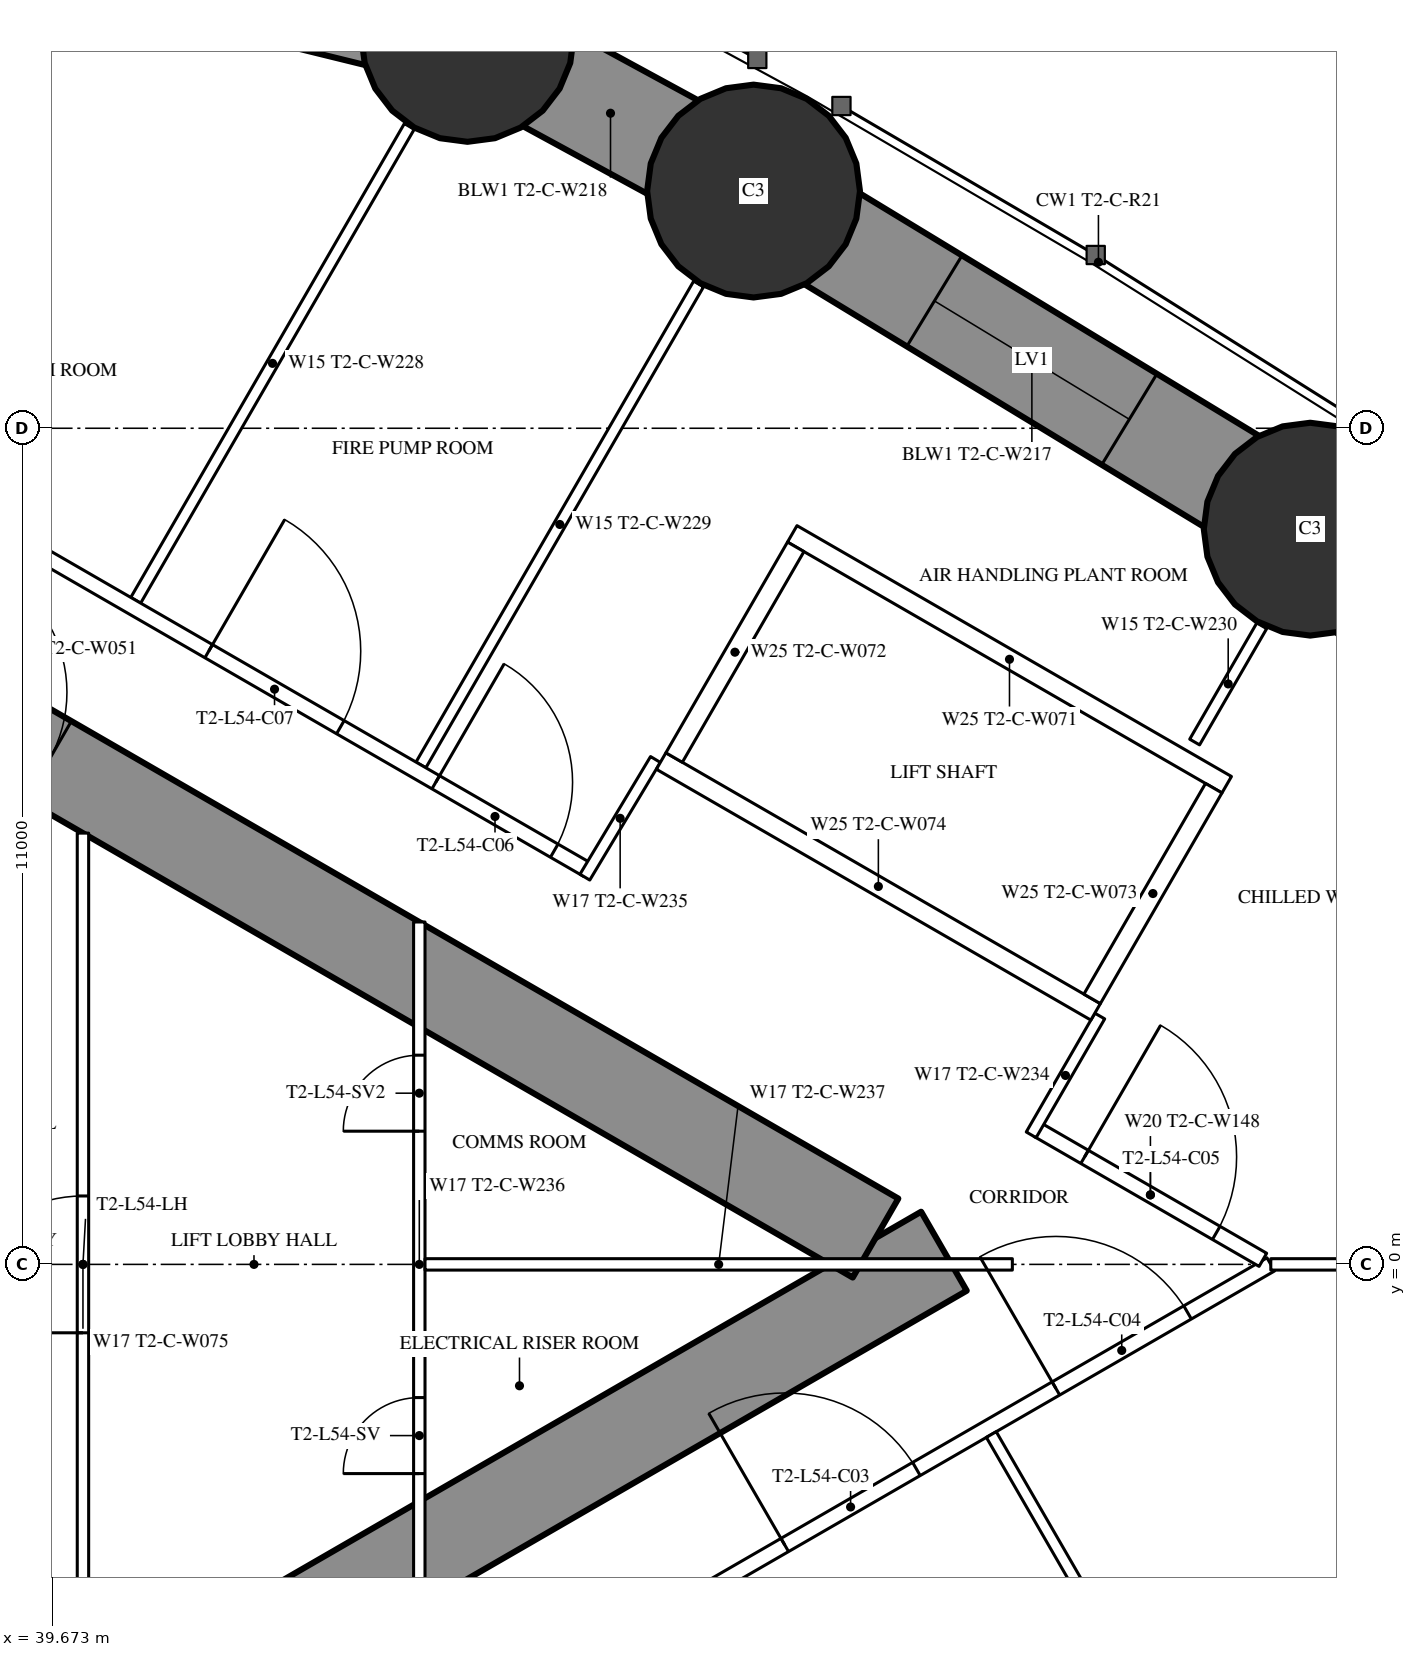
"""IFC4 building model, lengths in metres.
Left out: names, types, materials, properties, quantities, classifications, styles, units other than length and angle.
Written with IfcOpenShell. Run it as: python <this file> out.ifc"""

import sys

from ifc_helpers import new_model, si_unit, direction, frame, frame_2d, origin, origin_2d, place, context, subcontext, project, spatial, rectangle, circle, extrude, element, fill, save


model = new_model("IFC4")
c1 = context("Model", 3, precision=1e-05, world=origin(), true_north=direction((0.0, 1.0)))
c2 = subcontext(c1, "Body", "Model", "MODEL_VIEW")
j1 = project(units=[si_unit("LENGTHUNIT", "METRE"), si_unit("PLANEANGLEUNIT", "RADIAN")], contexts=[c1])
p1 = place(None, origin())
s1 = spatial("IfcSite", under=j1, at=p1, CompositionType="ELEMENT")
p2 = place(p1, origin())
s2 = spatial("IfcBuilding", under=s1, at=p2, CompositionType="ELEMENT")
p3 = place(p2, frame((0.0, 0.0, 201.8)))
s3 = spatial("IfcBuildingStorey", under=s2, at=p3, CompositionType="ELEMENT", Elevation=201.8)
for number, where, z_axis, x_axis in (
    (1, (56.221, 9.672, 0.0), (0.0, 0.0, 1.0), (1.0, 0.0, 0.0)),
    (2, (48.897, 14.121, 0.0), (0.0, 0.0, 1.0), (1.0, 0.0, 0.0)),
    (3, (45.134, 16.168, 0.0), (0.0, 0.0, 1.0), (1.0, 0.0, 0.0)),
):
    element("IfcColumn", number, at=place(p3, frame(where, z_axis=z_axis, x_axis=x_axis)), inside=s3, PredefinedType="COLUMN", context=c2, shape_type="SweptSolid", body=[
        extrude(circle(Radius=1.4, at=origin_2d()), origin(), (0.0, 0.0, 1.0), 3.5),
    ])
p4 = place(p3, frame((27.2, -13.8, 0.0), z_axis=(0.0, 0.0, 1.0), x_axis=(0.866027159892, 0.499996958321, 0.0)))
e4 = element("IfcWall", 4, at=p4, inside=s3, PredefinedType="SHEAR", context=c2, shape_type="SweptSolid", body=[
    extrude(rectangle(XDim=27.947, YDim=1.2, at=frame_2d((13.973, 0.0))), origin(), (0.0, 0.0, 1.0), 3.5),
])
p5 = place(p4, frame((6.5, 0.0, 0.0)))
e5 = element("IfcOpeningElement", 5, at=p5, cuts=e4, PredefinedType="OPENING", context=c2, shape_type="SweptSolid", body=[
    extrude(rectangle(XDim=1.0, YDim=2.2, at=frame_2d((0.5, 1.1))), frame((0.0, 0.61, 0.0), z_axis=(0.0, -1.0, 0.0), x_axis=(1.0, 0.0, 0.0)), (0.0, 0.0, 1.0), 1.22),
])
p6 = place(p4, frame((14.045, 0.0, 0.0)))
e6 = element("IfcOpeningElement", 6, at=p6, cuts=e4, PredefinedType="OPENING", context=c2, shape_type="SweptSolid", body=[
    extrude(rectangle(XDim=1.8, YDim=2.2, at=frame_2d((0.9, 1.1))), frame((0.0, 0.61, 0.0), z_axis=(0.0, -1.0, 0.0), x_axis=(1.0, 0.0, 0.0)), (0.0, 0.0, 1.0), 1.22),
])
p7 = place(p3, frame((27.2, 13.8, 0.0), z_axis=(0.0, 0.0, 1.0), x_axis=(0.866024515034, -0.500001539357, 0.0)))
e7 = element("IfcWall", 7, at=p7, inside=s3, PredefinedType="SHEAR", context=c2, shape_type="SweptSolid", body=[
    extrude(rectangle(XDim=26.907, YDim=1.2, at=frame_2d((13.454, 0.0))), origin(), (0.0, 0.0, 1.0), 3.5),
])
p8 = place(p7, frame((6.5, 0.0, 0.0)))
e8 = element("IfcOpeningElement", 8, at=p8, cuts=e7, PredefinedType="OPENING", context=c2, shape_type="SweptSolid", body=[
    extrude(rectangle(XDim=1.0, YDim=2.2, at=frame_2d((0.5, 1.1))), frame((0.0, 0.61, 0.0), z_axis=(0.0, -1.0, 0.0), x_axis=(1.0, 0.0, 0.0)), (0.0, 0.0, 1.0), 1.22),
])
p9 = place(p7, frame((12.545, 0.0, 0.0)))
e9 = element("IfcOpeningElement", 9, at=p9, cuts=e7, PredefinedType="OPENING", context=c2, shape_type="SweptSolid", body=[
    extrude(rectangle(XDim=1.8, YDim=2.2, at=frame_2d((0.9, 1.1))), frame((0.0, 0.61, 0.0), z_axis=(0.0, -1.0, 0.0), x_axis=(1.0, 0.0, 0.0)), (0.0, 0.0, 1.0), 1.22),
])
p10 = place(p3, frame((56.221, -9.672, 0.0), z_axis=(0.0, 0.0, 1.0), x_axis=(0.697649905443, 0.716438838587, 0.0)))
e10 = element("IfcWall", 10, at=p10, inside=s3, PredefinedType="SHEAR", context=c2, shape_type="SweptSolid", body=[
    extrude(rectangle(XDim=13.501, YDim=1.4, at=frame_2d((6.75, 0.0))), origin(), (0.0, 0.0, 1.0), 3.5),
])
p11 = place(p10, frame((5.25, 0.0, 0.6)))
e11 = element("IfcOpeningElement", 11, at=p11, cuts=e10, PredefinedType="OPENING", context=c2, shape_type="SweptSolid", body=[
    extrude(rectangle(XDim=3.0, YDim=1.2, at=frame_2d((1.5, 0.6))), frame((0.0, 0.71, 0.0), z_axis=(0.0, -1.0, 0.0), x_axis=(1.0, 0.0, 0.0)), (0.0, 0.0, 1.0), 1.42),
])
p12 = place(p3, frame((65.64, 0.0, 0.0), z_axis=(0.0, 0.0, 1.0), x_axis=(-0.697649905443, 0.716438838587, 0.0)))
e12 = element("IfcWall", 12, at=p12, inside=s3, PredefinedType="SHEAR", context=c2, shape_type="SweptSolid", body=[
    extrude(rectangle(XDim=13.501, YDim=1.4, at=frame_2d((6.75, 0.0))), origin(), (0.0, 0.0, 1.0), 3.5),
])
p13 = place(p12, frame((5.25, 0.0, 0.6)))
e13 = element("IfcOpeningElement", 13, at=p13, cuts=e12, PredefinedType="OPENING", context=c2, shape_type="SweptSolid", body=[
    extrude(rectangle(XDim=3.0, YDim=1.2, at=frame_2d((1.5, 0.6))), frame((0.0, 0.71, 0.0), z_axis=(0.0, -1.0, 0.0), x_axis=(1.0, 0.0, 0.0)), (0.0, 0.0, 1.0), 1.42),
])
p14 = place(p3, frame((56.221, 9.672, 0.0), z_axis=(0.0, 0.0, 1.0), x_axis=(-0.854692251129, 0.519135007353, 0.0)))
e14 = element("IfcWall", 14, at=p14, inside=s3, PredefinedType="SHEAR", context=c2, shape_type="SweptSolid", body=[
    extrude(rectangle(XDim=8.569, YDim=1.4, at=frame_2d((4.284, 0.0))), origin(), (0.0, 0.0, 1.0), 3.5),
])
p15 = place(p14, frame((2.784, 0.0, 0.6)))
e15 = element("IfcOpeningElement", 15, at=p15, cuts=e14, PredefinedType="OPENING", context=c2, shape_type="SweptSolid", body=[
    extrude(rectangle(XDim=3.0, YDim=1.2, at=frame_2d((1.5, 0.6))), frame((0.0, 0.71, 0.0), z_axis=(0.0, -1.0, 0.0), x_axis=(1.0, 0.0, 0.0)), (0.0, 0.0, 1.0), 1.42),
])
p16 = place(p3, frame((48.897, 14.121, 0.0), z_axis=(0.0, 0.0, 1.0), x_axis=(-0.878404597051, 0.477917737566, 0.0)))
e16 = element("IfcWall", 16, at=p16, inside=s3, PredefinedType="SHEAR", context=c2, shape_type="SweptSolid", body=[
    extrude(rectangle(XDim=4.285, YDim=1.4, at=frame_2d((2.143, 0.0))), origin(), (0.0, 0.0, 1.0), 3.5),
])
p17 = place(p3, frame((45.134, 16.168, 0.0), z_axis=(0.0, 0.0, 1.0), x_axis=(-0.971093253227, 0.238700426344, 0.0)))
e17 = element("IfcWall", 17, at=p17, inside=s3, PredefinedType="SHEAR", context=c2, shape_type="SweptSolid", body=[
    extrude(rectangle(XDim=13.772, YDim=1.4, at=frame_2d((6.886, 0.0))), origin(), (0.0, 0.0, 1.0), 3.5),
])
p18 = place(p17, frame((5.386, 0.0, 0.6)))
e18 = element("IfcOpeningElement", 18, at=p18, cuts=e17, PredefinedType="OPENING", context=c2, shape_type="SweptSolid", body=[
    extrude(rectangle(XDim=3.0, YDim=1.2, at=frame_2d((1.5, 0.6))), frame((0.0, 0.71, 0.0), z_axis=(0.0, -1.0, 0.0), x_axis=(1.0, 0.0, 0.0)), (0.0, 0.0, 1.0), 1.42),
])
p19 = place(p3, frame((27.903, -16.05, 0.0), z_axis=(0.0, 0.0, 1.0), x_axis=(0.866022581743, 0.500004887887, 0.0)))
e19 = element("IfcWall", 19, at=p19, inside=s3, PredefinedType="PARTITIONING", context=c2, shape_type="SweptSolid", body=[
    extrude(rectangle(XDim=32.1, YDim=0.2, at=frame_2d((16.05, 0.0))), origin(), (0.0, 0.0, 1.0), 3.25),
])
p20 = place(p19, frame((5.212, 0.0, 0.0)))
e20 = element("IfcOpeningElement", 20, at=p20, cuts=e19, PredefinedType="OPENING", context=c2, shape_type="SweptSolid", body=[
    extrude(rectangle(XDim=2.0, YDim=2.4, at=frame_2d((1.0, 1.2))), frame((0.0, 0.11, 0.0), z_axis=(0.0, -1.0, 0.0), x_axis=(1.0, 0.0, 0.0)), (0.0, 0.0, 1.0), 0.22),
])
p21 = place(p19, frame((18.133, 0.0, 0.0)))
e21 = element("IfcOpeningElement", 21, at=p21, cuts=e19, PredefinedType="OPENING", context=c2, shape_type="SweptSolid", body=[
    extrude(rectangle(XDim=2.0, YDim=2.4, at=frame_2d((1.0, 1.2))), frame((0.0, 0.11, 0.0), z_axis=(0.0, -1.0, 0.0), x_axis=(1.0, 0.0, 0.0)), (0.0, 0.0, 1.0), 0.22),
])
p22 = place(p19, frame((24.717, 0.0, 0.0)))
e22 = element("IfcOpeningElement", 22, at=p22, cuts=e19, PredefinedType="OPENING", context=c2, shape_type="SweptSolid", body=[
    extrude(rectangle(XDim=2.0, YDim=2.4, at=frame_2d((1.0, 1.2))), frame((0.0, 0.11, 0.0), z_axis=(0.0, -1.0, 0.0), x_axis=(1.0, 0.0, 0.0)), (0.0, 0.0, 1.0), 0.22),
])
p23 = place(p19, frame((28.836, 0.0, 0.0)))
e23 = element("IfcOpeningElement", 23, at=p23, cuts=e19, PredefinedType="OPENING", context=c2, shape_type="SweptSolid", body=[
    extrude(rectangle(XDim=2.0, YDim=2.4, at=frame_2d((1.0, 1.2))), frame((0.0, 0.11, 0.0), z_axis=(0.0, -1.0, 0.0), x_axis=(1.0, 0.0, 0.0)), (0.0, 0.0, 1.0), 0.22),
])
p24 = place(p3, frame((52.025, -2.238, 0.0), z_axis=(0.0, 0.0, 1.0), x_axis=(0.499983785035, -0.866034765296, 0.0)))
e24 = element("IfcWall", 24, at=p24, inside=s3, PredefinedType="PARTITIONING", context=c2, shape_type="SweptSolid", body=[
    extrude(rectangle(XDim=7.116, YDim=0.15, at=frame_2d((3.558, 0.0))), origin(), (0.0, 0.0, 1.0), 2.05),
])
p25 = place(p3, frame((40.769, 8.737, 0.0), z_axis=(0.0, 0.0, 1.0), x_axis=(0.500013115284, 0.866017831539, 0.0)))
e25 = element("IfcWall", 25, at=p25, inside=s3, PredefinedType="PARTITIONING", context=c2, shape_type="SweptSolid", body=[
    extrude(rectangle(XDim=7.198, YDim=0.15, at=frame_2d((3.599, 0.0))), origin(), (0.0, 0.0, 1.0), 2.05),
])
p26 = place(p3, frame((44.521, 6.571, 0.0), z_axis=(0.0, 0.0, 1.0), x_axis=(0.500020376429, 0.866013639128, 0.0)))
e26 = element("IfcWall", 26, at=p26, inside=s3, PredefinedType="PARTITIONING", context=c2, shape_type="SweptSolid", body=[
    extrude(rectangle(XDim=7.306, YDim=0.15, at=frame_2d((3.653, 0.0))), origin(), (0.0, 0.0, 1.0), 2.05),
])
p27 = place(p3, frame((55.702, 0.0, 0.0), z_axis=(0.0, 0.0, 1.0), x_axis=(1.0, 0.0, 0.0)))
e27 = element("IfcWall", 27, at=p27, inside=s3, PredefinedType="PARTITIONING", context=c2, shape_type="SweptSolid", body=[
    extrude(rectangle(XDim=8.518, YDim=0.15, at=frame_2d((4.259, 0.0))), origin(), (0.0, 0.0, 1.0), 2.05),
])
p28 = place(p3, frame((54.7, 6.872, 0.0), z_axis=(0.0, 0.0, 1.0), x_axis=(0.499989690894, 0.866031355668, 0.0)))
e28 = element("IfcWall", 28, at=p28, inside=s3, PredefinedType="PARTITIONING", context=c2, shape_type="SweptSolid", body=[
    extrude(rectangle(XDim=1.766, YDim=0.15, at=frame_2d((0.883, 0.0))), origin(), (0.0, 0.0, 1.0), 3.25),
])
p29 = place(p3, frame((27.903, 16.05, 0.0), z_axis=(0.0, 0.0, 1.0), x_axis=(0.866024818307, -0.500001014076, 0.0)))
e29 = element("IfcWall", 29, at=p29, inside=s3, PredefinedType="PARTITIONING", context=c2, shape_type="SweptSolid", body=[
    extrude(rectangle(XDim=21.723, YDim=0.2, at=frame_2d((10.862, 0.0))), origin(), (0.0, 0.0, 1.0), 3.25),
])
p30 = place(p29, frame((15.966, 0.0, 0.0)))
e30 = element("IfcOpeningElement", 30, at=p30, cuts=e29, PredefinedType="OPENING", context=c2, shape_type="SweptSolid", body=[
    extrude(rectangle(XDim=2.0, YDim=2.03, at=frame_2d((1.0, 1.015))), frame((0.0, 0.11, 0.0), z_axis=(0.0, -1.0, 0.0), x_axis=(1.0, 0.0, 0.0)), (0.0, 0.0, 1.0), 0.22),
])
p31 = place(p29, frame((5.662, 0.0, 0.0)))
e31 = element("IfcOpeningElement", 31, at=p31, cuts=e29, PredefinedType="OPENING", context=c2, shape_type="SweptSolid", body=[
    extrude(rectangle(XDim=2.0, YDim=2.4, at=frame_2d((1.0, 1.2))), frame((0.0, 0.11, 0.0), z_axis=(0.0, -1.0, 0.0), x_axis=(1.0, 0.0, 0.0)), (0.0, 0.0, 1.0), 0.22),
])
p32 = place(p29, frame((19.415, 0.0, 0.0)))
e32 = element("IfcOpeningElement", 32, at=p32, cuts=e29, PredefinedType="OPENING", context=c2, shape_type="SweptSolid", body=[
    extrude(rectangle(XDim=1.8, YDim=2.2, at=frame_2d((0.9, 1.1))), frame((0.0, 0.11, 0.0), z_axis=(0.0, -1.0, 0.0), x_axis=(1.0, 0.0, 0.0)), (0.0, 0.0, 1.0), 0.22),
])
p33 = place(p3, frame((52.639, 1.769, 0.0), z_axis=(0.0, 0.0, 1.0), x_axis=(0.866027340901, -0.4999966448, 0.0)))
e33 = element("IfcWall", 33, at=p33, inside=s3, PredefinedType="PARTITIONING", context=c2, shape_type="SweptSolid", body=[
    extrude(rectangle(XDim=3.417, YDim=0.2, at=frame_2d((1.708, 0.0))), origin(), (0.0, 0.0, 1.0), 3.25),
])
p34 = place(p33, frame((0.708, 0.0, 0.0)))
e34 = element("IfcOpeningElement", 34, at=p34, cuts=e33, PredefinedType="OPENING", context=c2, shape_type="SweptSolid", body=[
    extrude(rectangle(XDim=2.0, YDim=2.03, at=frame_2d((1.0, 1.015))), frame((0.0, 0.11, 0.0), z_axis=(0.0, -1.0, 0.0), x_axis=(1.0, 0.0, 0.0)), (0.0, 0.0, 1.0), 0.22),
])
p35 = place(p3, frame((52.55, 1.704, 0.0), z_axis=(0.0, 0.0, 1.0), x_axis=(0.499980071345, 0.866036909293, 0.0)))
e35 = element("IfcWall", 35, at=p35, inside=s3, PredefinedType="PARTITIONING", context=c2, shape_type="SweptSolid", body=[
    extrude(rectangle(XDim=1.805, YDim=0.15, at=frame_2d((0.902, 0.0))), origin(), (0.0, 0.0, 1.0), 3.25),
])
p36 = place(p3, frame((47.606, 6.642, 0.0), z_axis=(0.0, 0.0, 1.0), x_axis=(-0.514296815006, -0.857612258585, 0.0)))
e36 = element("IfcWall", 36, at=p36, inside=s3, PredefinedType="PARTITIONING", context=c2, shape_type="SweptSolid", body=[
    extrude(rectangle(XDim=1.805, YDim=0.15, at=frame_2d((0.902, 0.0))), origin(), (0.0, 0.0, 1.0), 3.25),
])
p37 = place(p3, frame((40.075, -5.674, 0.0), z_axis=(0.0, 0.0, 1.0), x_axis=(0.0, 1.0, 0.0)))
e37 = element("IfcWall", 37, at=p37, inside=s3, PredefinedType="PARTITIONING", context=c2, shape_type="SweptSolid", body=[
    extrude(rectangle(XDim=11.348, YDim=0.15, at=frame_2d((5.674, 0.0))), origin(), (0.0, 0.0, 1.0), 3.25),
])
p38 = place(p37, frame((4.774, 0.0, 0.0)))
e38 = element("IfcOpeningElement", 38, at=p38, cuts=e37, PredefinedType="OPENING", context=c2, shape_type="SweptSolid", body=[
    extrude(rectangle(XDim=1.8, YDim=2.2, at=frame_2d((0.9, 1.1))), frame((0.0, 0.085, 0.0), z_axis=(0.0, -1.0, 0.0), x_axis=(1.0, 0.0, 0.0)), (0.0, 0.0, 1.0), 0.17),
])
p39 = place(p3, frame((44.5, -4.505, 0.0), z_axis=(0.0, 0.0, 1.0), x_axis=(0.0, 1.0, 0.0)))
e39 = element("IfcWall", 39, at=p39, inside=s3, PredefinedType="PARTITIONING", context=c2, shape_type="SweptSolid", body=[
    extrude(rectangle(XDim=9.009, YDim=0.15, at=frame_2d((4.505, 0.0))), origin(), (0.0, 0.0, 1.0), 3.25),
])
p40 = place(p39, frame((1.752, 0.0, 0.0)))
e40 = element("IfcOpeningElement", 40, at=p40, cuts=e39, PredefinedType="OPENING", context=c2, shape_type="SweptSolid", body=[
    extrude(rectangle(XDim=1.0, YDim=2.2, at=frame_2d((0.5, 1.1))), frame((0.0, 0.085, 0.0), z_axis=(0.0, -1.0, 0.0), x_axis=(1.0, 0.0, 0.0)), (0.0, 0.0, 1.0), 0.17),
])
p41 = place(p39, frame((6.257, 0.0, 0.0)))
e41 = element("IfcOpeningElement", 41, at=p41, cuts=e39, PredefinedType="OPENING", context=c2, shape_type="SweptSolid", body=[
    extrude(rectangle(XDim=1.0, YDim=2.2, at=frame_2d((0.5, 1.1))), frame((0.0, 0.085, 0.0), z_axis=(0.0, -1.0, 0.0), x_axis=(1.0, 0.0, 0.0)), (0.0, 0.0, 1.0), 0.17),
])
p42 = place(p3, frame((44.575, 0.0, 0.0), z_axis=(0.0, 0.0, 1.0), x_axis=(1.0, 0.0, 0.0)))
e42 = element("IfcWall", 42, at=p42, inside=s3, PredefinedType="PARTITIONING", context=c2, shape_type="SweptSolid", body=[
    extrude(rectangle(XDim=7.727, YDim=0.15, at=frame_2d((3.864, 0.0))), origin(), (0.0, 0.0, 1.0), 2.05),
])
for number, where, z_axis, x_axis in (
    (43, (47.681, 6.622, 0.0), (0.0, 0.0, 1.0), (0.866, -0.5, 0.0)),
    (44, (49.406, 9.611, 0.0), (0.0, 0.0, 1.0), (0.866, -0.5, 0.0)),
):
    element("IfcWall", number, at=place(p3, frame(where, z_axis=z_axis, x_axis=x_axis)), inside=s3, PredefinedType="PARTITIONING", context=c2, shape_type="SweptSolid", body=[
        extrude(rectangle(XDim=6.6, YDim=0.25, at=frame_2d((3.3, 0.0))), origin(), (0.0, 0.0, 1.0), 3.25),
    ])
p43 = place(p3, frame((47.852, 6.668, 0.0), z_axis=(0.0, 0.0, 1.0), x_axis=(0.499929347863, 0.866066190972, 0.0)))
e45 = element("IfcWall", 45, at=p43, inside=s3, PredefinedType="PARTITIONING", context=c2, shape_type="SweptSolid", body=[
    extrude(rectangle(XDim=3.201, YDim=0.25, at=frame_2d((1.6, 0.0))), origin(), (0.0, 0.0, 1.0), 3.25),
])
p44 = place(p3, frame((53.352, 3.493, 0.0), z_axis=(0.0, 0.0, 1.0), x_axis=(0.499872130319, 0.866099216793, 0.0)))
e46 = element("IfcWall", 46, at=p44, inside=s3, PredefinedType="PARTITIONING", context=c2, shape_type="SweptSolid", body=[
    extrude(rectangle(XDim=3.2, YDim=0.25, at=frame_2d((1.6, 0.0))), origin(), (0.0, 0.0, 1.0), 3.25),
])
p45 = place(p15, origin())
e47 = element("IfcWindow", 47, at=p45, inside=s3, PartitioningType="SINGLE_PANEL", PredefinedType="WINDOW", context=c2, shape_type="SweptSolid", body=[
    extrude(rectangle(XDim=3.0, YDim=1.2, at=frame_2d((1.5, 0.6))), frame((0.0, 0.03, 0.0), z_axis=(0.0, -1.0, 0.0), x_axis=(1.0, 0.0, 0.0)), (0.0, 0.0, 1.0), 0.06),
])
fill(e15, e47)
p46 = place(p22, origin())
e48 = element("IfcDoor", 48, at=p46, inside=s3, OperationType="DOUBLE_DOOR_SINGLE_SWING", PredefinedType="DOOR", context=c2, shape_type="SweptSolid", body=[
    extrude(rectangle(XDim=2.0, YDim=2.4, at=frame_2d((1.0, 1.2))), frame((0.0, 0.025, 0.0), z_axis=(0.0, -1.0, 0.0), x_axis=(1.0, 0.0, 0.0)), (0.0, 0.0, 1.0), 0.05),
])
fill(e22, e48)
p47 = place(p23, origin())
e49 = element("IfcDoor", 49, at=p47, inside=s3, OperationType="DOUBLE_DOOR_SINGLE_SWING", PredefinedType="DOOR", context=c2, shape_type="SweptSolid", body=[
    extrude(rectangle(XDim=2.0, YDim=2.4, at=frame_2d((1.0, 1.2))), frame((0.0, 0.025, 0.0), z_axis=(0.0, -1.0, 0.0), x_axis=(1.0, 0.0, 0.0)), (0.0, 0.0, 1.0), 0.05),
])
fill(e23, e49)
p48 = place(p30, origin())
e50 = element("IfcDoor", 50, at=p48, inside=s3, OperationType="DOUBLE_DOOR_SINGLE_SWING", PredefinedType="DOOR", context=c2, shape_type="SweptSolid", body=[
    extrude(rectangle(XDim=2.0, YDim=2.03, at=frame_2d((1.0, 1.015))), frame((0.0, 0.025, 0.0), z_axis=(0.0, -1.0, 0.0), x_axis=(1.0, 0.0, 0.0)), (0.0, 0.0, 1.0), 0.05),
])
fill(e30, e50)
p49 = place(p34, origin())
e51 = element("IfcDoor", 51, at=p49, inside=s3, OperationType="DOUBLE_DOOR_SINGLE_SWING", PredefinedType="DOOR", context=c2, shape_type="SweptSolid", body=[
    extrude(rectangle(XDim=2.0, YDim=2.03, at=frame_2d((1.0, 1.015))), frame((0.0, 0.025, 0.0), z_axis=(0.0, -1.0, 0.0), x_axis=(1.0, 0.0, 0.0)), (0.0, 0.0, 1.0), 0.05),
])
fill(e34, e51)
p50 = place(p32, origin())
e52 = element("IfcDoor", 52, at=p50, inside=s3, OperationType="DOUBLE_DOOR_SINGLE_SWING", PredefinedType="DOOR", context=c2, shape_type="SweptSolid", body=[
    extrude(rectangle(XDim=1.8, YDim=2.2, at=frame_2d((0.9, 1.1))), frame((0.0, 0.025, 0.0), z_axis=(0.0, -1.0, 0.0), x_axis=(1.0, 0.0, 0.0)), (0.0, 0.0, 1.0), 0.05),
])
fill(e32, e52)
p51 = place(p38, origin())
e53 = element("IfcDoor", 53, at=p51, inside=s3, OperationType="DOUBLE_DOOR_SINGLE_SWING", PredefinedType="DOOR", context=c2, shape_type="SweptSolid", body=[
    extrude(rectangle(XDim=1.8, YDim=2.2, at=frame_2d((0.9, 1.1))), frame((0.0, 0.025, 0.0), z_axis=(0.0, -1.0, 0.0), x_axis=(1.0, 0.0, 0.0)), (0.0, 0.0, 1.0), 0.05),
])
fill(e38, e53)
p52 = place(p40, origin())
e54 = element("IfcDoor", 54, at=p52, inside=s3, OperationType="SINGLE_SWING_LEFT", PredefinedType="DOOR", context=c2, shape_type="SweptSolid", body=[
    extrude(rectangle(XDim=1.0, YDim=2.2, at=frame_2d((0.5, 1.1))), frame((0.0, 0.025, 0.0), z_axis=(0.0, -1.0, 0.0), x_axis=(1.0, 0.0, 0.0)), (0.0, 0.0, 1.0), 0.05),
])
fill(e40, e54)
p53 = place(p41, origin())
e55 = element("IfcDoor", 55, at=p53, inside=s3, OperationType="SINGLE_SWING_LEFT", PredefinedType="DOOR", context=c2, shape_type="SweptSolid", body=[
    extrude(rectangle(XDim=1.0, YDim=2.2, at=frame_2d((0.5, 1.1))), frame((0.0, 0.025, 0.0), z_axis=(0.0, -1.0, 0.0), x_axis=(1.0, 0.0, 0.0)), (0.0, 0.0, 1.0), 0.05),
])
fill(e41, e55)
save(model, sys.argv[1])
